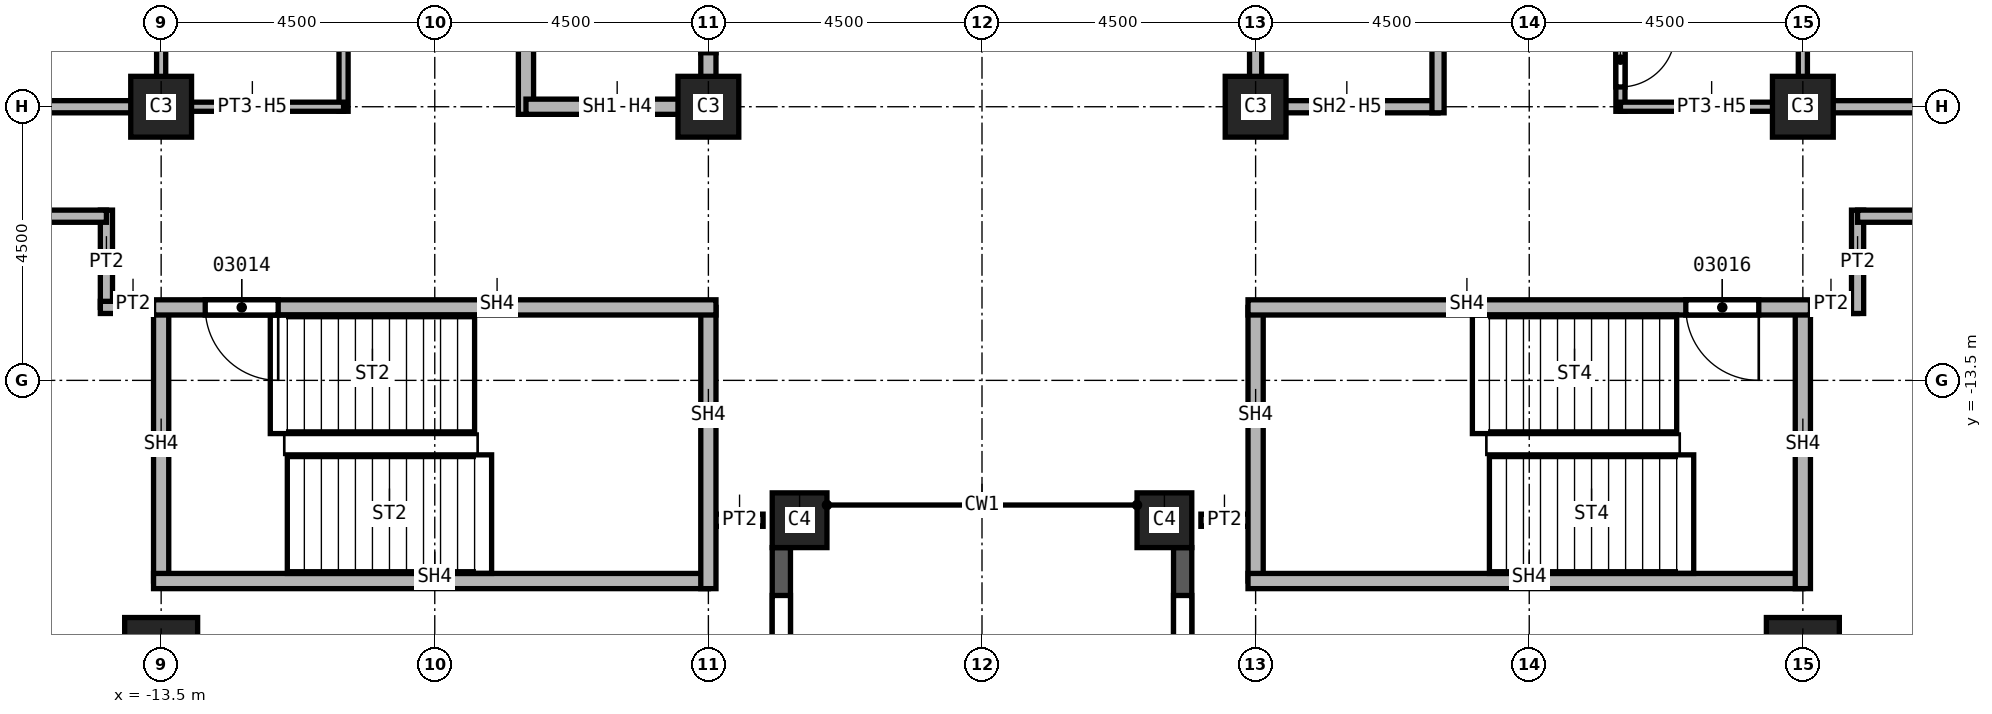
"""IFC4 building model, lengths in metres.
Left out: names, types, materials, properties, quantities, classifications, styles, units other than length and angle.
Written with IfcOpenShell. Run it as: python <this file> out.ifc"""

import sys

from ifc_helpers import new_model, si_unit, direction, frame, frame_2d, origin, origin_2d, place, context, subcontext, project, spatial, rectangle, extrude, element, fill, save


model = new_model("IFC4")
c1 = context("Model", 3, precision=1e-05, world=origin(), true_north=direction((0.0, 1.0)))
c2 = subcontext(c1, "Body", "Model", "MODEL_VIEW")
j1 = project(units=[si_unit("LENGTHUNIT", "METRE"), si_unit("PLANEANGLEUNIT", "RADIAN")], contexts=[c1])
p1 = place(None, origin())
s1 = spatial("IfcSite", under=j1, at=p1, CompositionType="ELEMENT")
p2 = place(p1, origin())
s2 = spatial("IfcBuilding", under=s1, at=p2, CompositionType="ELEMENT")
p3 = place(p2, frame((0.0, 0.0, 92.0)))
s3 = spatial("IfcBuildingStorey", under=s2, at=p3, CompositionType="ELEMENT", Elevation=92.0)
for number, where, z_axis, x_axis in (
    (1, (13.5, -18.0, 0.0), (0.0, 0.0, 1.0), (1.0, 0.0, 0.0)),
    (2, (-13.5, -18.0, 0.0), (0.0, 0.0, 1.0), (1.0, 0.0, 0.0)),
):
    element("IfcColumn", number, at=place(p3, frame(where, z_axis=z_axis, x_axis=x_axis)), inside=s3, PredefinedType="COLUMN", context=c2, shape_type="SweptSolid", body=[
        extrude(rectangle(XDim=1.2, YDim=1.2, at=origin_2d()), origin(), (0.0, 0.0, 1.0), 3.7),
    ])
for number, where, z_axis, x_axis in (
    (3, (4.5, -9.0, 0.0), (0.0, 0.0, 1.0), (1.0, 0.0, 0.0)),
    (4, (13.5, -9.0, 0.0), (0.0, 0.0, 1.0), (1.0, 0.0, 0.0)),
    (5, (-4.5, -9.0, 0.0), (0.0, 0.0, 1.0), (1.0, 0.0, 0.0)),
    (6, (-13.5, -9.0, 0.0), (0.0, 0.0, 1.0), (1.0, 0.0, 0.0)),
):
    element("IfcColumn", number, at=place(p3, frame(where, z_axis=z_axis, x_axis=x_axis)), inside=s3, PredefinedType="COLUMN", context=c2, shape_type="SweptSolid", body=[
        extrude(rectangle(XDim=1.0, YDim=1.0, at=origin_2d()), origin(), (0.0, 0.0, 1.0), 3.7),
    ])
for number, where, z_axis, x_axis in (
    (7, (3.0, -15.8, 0.0), (0.0, 0.0, 1.0), (1.0, 0.0, 0.0)),
    (8, (-3.0, -15.8, 0.0), (0.0, 0.0, 1.0), (1.0, 0.0, 0.0)),
):
    element("IfcColumn", number, at=place(p3, frame(where, z_axis=z_axis, x_axis=x_axis)), inside=s3, PredefinedType="COLUMN", context=c2, shape_type="SweptSolid", body=[
        extrude(rectangle(XDim=0.9, YDim=0.9, at=origin_2d()), origin(), (0.0, 0.0, 1.0), 3.7),
    ])
p4 = place(p3, frame((-3.3, -24.2, 0.0), z_axis=(0.0, 0.0, 1.0), x_axis=(0.0, 1.0, 0.0)))
e9 = element("IfcWall", 9, at=p4, inside=s3, PredefinedType="SOLIDWALL", context=c2, shape_type="SweptSolid", body=[
    extrude(rectangle(XDim=7.95, YDim=0.3, at=frame_2d((3.975, 0.0))), origin(), (0.0, 0.0, 1.0), 3.1),
])
p5 = place(p4, frame((0.788, 0.0, 0.8)))
e10 = element("IfcOpeningElement", 10, at=p5, cuts=e9, PredefinedType="OPENING", context=c2, shape_type="SweptSolid", body=[
    extrude(rectangle(XDim=2.4, YDim=1.95, at=frame_2d((1.2, 0.975))), frame((0.0, 0.15, 0.0), z_axis=(0.0, -1.0, 0.0), x_axis=(1.0, 0.0, 0.0)), (0.0, 0.0, 1.0), 0.3),
])
p6 = place(p4, frame((4.762, 0.0, 0.8)))
e11 = element("IfcOpeningElement", 11, at=p6, cuts=e9, PredefinedType="OPENING", context=c2, shape_type="SweptSolid", body=[
    extrude(rectangle(XDim=2.4, YDim=1.95, at=frame_2d((1.2, 0.975))), frame((0.0, 0.15, 0.0), z_axis=(0.0, -1.0, 0.0), x_axis=(1.0, 0.0, 0.0)), (0.0, 0.0, 1.0), 0.3),
])
p7 = place(p3, frame((3.3, -16.25, 0.0), z_axis=(0.0, 0.0, 1.0), x_axis=(0.0, -1.0, 0.0)))
e12 = element("IfcWall", 12, at=p7, inside=s3, PredefinedType="SOLIDWALL", context=c2, shape_type="SweptSolid", body=[
    extrude(rectangle(XDim=7.95, YDim=0.3, at=frame_2d((3.975, 0.0))), origin(), (0.0, 0.0, 1.0), 3.1),
])
p8 = place(p7, frame((0.788, 0.0, 0.8)))
e13 = element("IfcOpeningElement", 13, at=p8, cuts=e12, PredefinedType="OPENING", context=c2, shape_type="SweptSolid", body=[
    extrude(rectangle(XDim=2.4, YDim=1.95, at=frame_2d((1.2, 0.975))), frame((0.0, 0.15, 0.0), z_axis=(0.0, -1.0, 0.0), x_axis=(1.0, 0.0, 0.0)), (0.0, 0.0, 1.0), 0.3),
])
p9 = place(p7, frame((4.762, 0.0, 0.8)))
e14 = element("IfcOpeningElement", 14, at=p9, cuts=e12, PredefinedType="OPENING", context=c2, shape_type="SweptSolid", body=[
    extrude(rectangle(XDim=2.4, YDim=1.95, at=frame_2d((1.2, 0.975))), frame((0.0, 0.15, 0.0), z_axis=(0.0, -1.0, 0.0), x_axis=(1.0, 0.0, 0.0)), (0.0, 0.0, 1.0), 0.3),
])
p10 = place(p3, frame((-18.0, -9.0, 0.0), z_axis=(0.0, 0.0, 1.0), x_axis=(1.0, 0.0, 0.0)))
e15 = element("IfcWall", 15, at=p10, inside=s3, PredefinedType="PARTITIONING", context=c2, shape_type="SweptSolid", body=[
    extrude(rectangle(XDim=4.5, YDim=0.2, at=frame_2d((2.25, 0.0))), origin(), (0.0, 0.0, 1.0), 3.7),
])
p11 = place(p3, frame((-14.4, -12.3, 0.0), z_axis=(0.0, 0.0, 1.0), x_axis=(0.0, 1.0, 0.0)))
e16 = element("IfcWall", 16, at=p11, inside=s3, PredefinedType="PARTITIONING", context=c2, shape_type="SweptSolid", body=[
    extrude(rectangle(XDim=1.6, YDim=0.2, at=frame_2d((0.8, 0.0))), origin(), (0.0, 0.0, 1.0), 3.7),
])
p12 = place(p3, frame((-14.4, -10.8, 0.0), z_axis=(0.0, 0.0, 1.0), x_axis=(-1.0, 0.0, 0.0)))
e17 = element("IfcWall", 17, at=p12, inside=s3, PredefinedType="PARTITIONING", context=c2, shape_type="SweptSolid", body=[
    extrude(rectangle(XDim=3.6, YDim=0.2, at=frame_2d((1.8, 0.0))), origin(), (0.0, 0.0, 1.0), 3.7),
])
p13 = place(p3, frame((-13.375, -12.3, 0.0), z_axis=(0.0, 0.0, 1.0), x_axis=(-1.0, 0.0, 0.0)))
e18 = element("IfcWall", 18, at=p13, inside=s3, PredefinedType="PARTITIONING", context=c2, shape_type="SweptSolid", body=[
    extrude(rectangle(XDim=1.125, YDim=0.2, at=frame_2d((0.562, 0.0))), origin(), (0.0, 0.0, 1.0), 3.7),
])
for number, where, z_axis, x_axis in (
    (19, (-3.6, -15.8, 0.0), (0.0, 0.0, 1.0), (-1.0, 0.0, 0.0)),
    (20, (4.5, -15.8, 0.0), (0.0, 0.0, 1.0), (-1.0, 0.0, 0.0)),
):
    element("IfcWall", number, at=place(p3, frame(where, z_axis=z_axis, x_axis=x_axis)), inside=s3, PredefinedType="PARTITIONING", context=c2, shape_type="SweptSolid", body=[
        extrude(rectangle(XDim=0.9, YDim=0.2, at=frame_2d((0.45, 0.0))), origin(), (0.0, 0.0, 1.0), 3.7),
    ])
p14 = place(p3, frame((13.5, -9.0, 0.0), z_axis=(0.0, 0.0, 1.0), x_axis=(1.0, 0.0, 0.0)))
e21 = element("IfcWall", 21, at=p14, inside=s3, PredefinedType="PARTITIONING", context=c2, shape_type="SweptSolid", body=[
    extrude(rectangle(XDim=4.5, YDim=0.2, at=frame_2d((2.25, 0.0))), origin(), (0.0, 0.0, 1.0), 3.7),
])
p15 = place(p3, frame((14.4, -12.3, 0.0), z_axis=(0.0, 0.0, 1.0), x_axis=(-1.0, 0.0, 0.0)))
e22 = element("IfcWall", 22, at=p15, inside=s3, PredefinedType="PARTITIONING", context=c2, shape_type="SweptSolid", body=[
    extrude(rectangle(XDim=1.025, YDim=0.2, at=frame_2d((0.512, 0.0))), origin(), (0.0, 0.0, 1.0), 3.7),
])
p16 = place(p3, frame((14.4, -10.7, 0.0), z_axis=(0.0, 0.0, 1.0), x_axis=(0.0, -1.0, 0.0)))
e23 = element("IfcWall", 23, at=p16, inside=s3, PredefinedType="PARTITIONING", context=c2, shape_type="SweptSolid", body=[
    extrude(rectangle(XDim=1.7, YDim=0.2, at=frame_2d((0.85, 0.0))), origin(), (0.0, 0.0, 1.0), 3.7),
])
p17 = place(p3, frame((18.0, -10.8, 0.0), z_axis=(0.0, 0.0, 1.0), x_axis=(-1.0, 0.0, 0.0)))
e24 = element("IfcWall", 24, at=p17, inside=s3, PredefinedType="PARTITIONING", context=c2, shape_type="SweptSolid", body=[
    extrude(rectangle(XDim=3.6, YDim=0.2, at=frame_2d((1.8, 0.0))), origin(), (0.0, 0.0, 1.0), 3.7),
])
p18 = place(p3, frame((4.5, -9.1, 0.0), z_axis=(0.0, 0.0, 1.0), x_axis=(0.0, 1.0, 0.0)))
e25 = element("IfcWall", 25, at=p18, inside=s3, PredefinedType="SOLIDWALL", context=c2, shape_type="SweptSolid", body=[
    extrude(rectangle(XDim=9.1, YDim=0.2, at=frame_2d((4.55, 0.0))), origin(), (0.0, 0.0, 1.0), 2.938),
])
p19 = place(p18, frame((1.6, 0.0, 0.0)))
e26 = element("IfcOpeningElement", 26, at=p19, cuts=e25, PredefinedType="OPENING", context=c2, shape_type="SweptSolid", body=[
    extrude(rectangle(XDim=1.1, YDim=2.1, at=frame_2d((0.55, 1.05))), frame((0.0, 0.1, 0.0), z_axis=(0.0, -1.0, 0.0), x_axis=(1.0, 0.0, 0.0)), (0.0, 0.0, 1.0), 0.2),
])
p20 = place(p18, frame((6.35, 0.0, 0.0)))
e27 = element("IfcOpeningElement", 27, at=p20, cuts=e25, PredefinedType="OPENING", context=c2, shape_type="SweptSolid", body=[
    extrude(rectangle(XDim=1.1, YDim=2.1, at=frame_2d((0.55, 1.05))), frame((0.0, 0.1, 0.0), z_axis=(0.0, -1.0, 0.0), x_axis=(1.0, 0.0, 0.0)), (0.0, 0.0, 1.0), 0.2),
])
p21 = place(p3, frame((7.5, -9.0, 0.0), z_axis=(0.0, 0.0, 1.0), x_axis=(-1.0, 0.0, 0.0)))
e28 = element("IfcWall", 28, at=p21, inside=s3, PredefinedType="SOLIDWALL", context=c2, shape_type="SweptSolid", body=[
    extrude(rectangle(XDim=3.0, YDim=0.2, at=frame_2d((1.5, 0.0))), origin(), (0.0, 0.0, 1.0), 2.938),
])
p22 = place(p3, frame((7.5, -2.875, 0.0), z_axis=(0.0, 0.0, 1.0), x_axis=(0.0, -1.0, 0.0)))
e29 = element("IfcWall", 29, at=p22, inside=s3, PredefinedType="SOLIDWALL", context=c2, shape_type="SweptSolid", body=[
    extrude(rectangle(XDim=6.225, YDim=0.2, at=frame_2d((3.113, 0.0))), origin(), (0.0, 0.0, 1.0), 3.7),
])
p23 = place(p3, frame((-7.5, -9.125, 0.0), z_axis=(0.0, 0.0, 1.0), x_axis=(0.0, 1.0, 0.0)))
e30 = element("IfcWall", 30, at=p23, inside=s3, PredefinedType="SOLIDWALL", context=c2, shape_type="SweptSolid", body=[
    extrude(rectangle(XDim=12.25, YDim=0.25, at=frame_2d((6.125, 0.0))), origin(), (0.0, 0.0, 1.0), 3.7),
])
p24 = place(p3, frame((-4.5, -9.0, 0.0), z_axis=(0.0, 0.0, 1.0), x_axis=(-1.0, 0.0, 0.0)))
e31 = element("IfcWall", 31, at=p24, inside=s3, PredefinedType="SOLIDWALL", context=c2, shape_type="SweptSolid", body=[
    extrude(rectangle(XDim=3.0, YDim=0.25, at=frame_2d((1.5, 0.0))), origin(), (0.0, 0.0, 1.0), 2.938),
])
p25 = place(p3, frame((-4.5, 0.0, 0.0), z_axis=(0.0, 0.0, 1.0), x_axis=(0.0, -1.0, 0.0)))
e32 = element("IfcWall", 32, at=p25, inside=s3, PredefinedType="SOLIDWALL", context=c2, shape_type="SweptSolid", body=[
    extrude(rectangle(XDim=9.125, YDim=0.25, at=frame_2d((4.562, 0.0))), origin(), (0.0, 0.0, 1.0), 2.938),
])
p26 = place(p25, frame((7.012, 0.0, 0.0)))
e33 = element("IfcOpeningElement", 33, at=p26, cuts=e32, PredefinedType="OPENING", context=c2, shape_type="SweptSolid", body=[
    extrude(rectangle(XDim=1.1, YDim=2.1, at=frame_2d((0.55, 1.05))), frame((0.0, 0.125, 0.0), z_axis=(0.0, -1.0, 0.0), x_axis=(1.0, 0.0, 0.0)), (0.0, 0.0, 1.0), 0.25),
])
p27 = place(p25, frame((3.95, 0.0, 0.0)))
e34 = element("IfcOpeningElement", 34, at=p27, cuts=e32, PredefinedType="OPENING", context=c2, shape_type="SweptSolid", body=[
    extrude(rectangle(XDim=1.1, YDim=2.1, at=frame_2d((0.55, 1.05))), frame((0.0, 0.125, 0.0), z_axis=(0.0, -1.0, 0.0), x_axis=(1.0, 0.0, 0.0)), (0.0, 0.0, 1.0), 0.25),
])
p28 = place(p25, frame((0.95, 0.0, 0.0)))
e35 = element("IfcOpeningElement", 35, at=p28, cuts=e32, PredefinedType="OPENING", context=c2, shape_type="SweptSolid", body=[
    extrude(rectangle(XDim=1.1, YDim=2.1, at=frame_2d((0.55, 1.05))), frame((0.0, 0.125, 0.0), z_axis=(0.0, -1.0, 0.0), x_axis=(1.0, 0.0, 0.0)), (0.0, 0.0, 1.0), 0.25),
])
p29 = place(p3, frame((-13.5, -16.8, 0.0), z_axis=(0.0, 0.0, 1.0), x_axis=(0.0, 1.0, 0.0)))
e36 = element("IfcWall", 36, at=p29, inside=s3, PredefinedType="SOLIDWALL", context=c2, shape_type="SweptSolid", body=[
    extrude(rectangle(XDim=4.5, YDim=0.25, at=frame_2d((2.25, 0.0))), origin(), (0.0, 0.0, 1.0), 3.7),
])
p30 = place(p3, frame((-4.5, -16.8, 0.0), z_axis=(0.0, 0.0, 1.0), x_axis=(-1.0, 0.0, 0.0)))
e37 = element("IfcWall", 37, at=p30, inside=s3, PredefinedType="SOLIDWALL", context=c2, shape_type="SweptSolid", body=[
    extrude(rectangle(XDim=9.125, YDim=0.25, at=frame_2d((4.562, 0.0))), origin(), (0.0, 0.0, 1.0), 3.7),
])
p31 = place(p3, frame((-4.5, -12.3, 0.0), z_axis=(0.0, 0.0, 1.0), x_axis=(0.0, -1.0, 0.0)))
e38 = element("IfcWall", 38, at=p31, inside=s3, PredefinedType="SOLIDWALL", context=c2, shape_type="SweptSolid", body=[
    extrude(rectangle(XDim=4.625, YDim=0.25, at=frame_2d((2.312, 0.0))), origin(), (0.0, 0.0, 1.0), 3.7),
])
p32 = place(p3, frame((-4.375, -12.3, 0.0), z_axis=(0.0, 0.0, 1.0), x_axis=(-1.0, 0.0, 0.0)))
e39 = element("IfcWall", 39, at=p32, inside=s3, PredefinedType="SOLIDWALL", context=c2, shape_type="SweptSolid", body=[
    extrude(rectangle(XDim=9.25, YDim=0.25, at=frame_2d((4.625, 0.0))), origin(), (0.0, 0.0, 1.0), 3.7),
])
p33 = place(p32, frame((7.2, 0.0, 0.0)))
e40 = element("IfcOpeningElement", 40, at=p33, cuts=e39, PredefinedType="OPENING", context=c2, shape_type="SweptSolid", body=[
    extrude(rectangle(XDim=1.2, YDim=2.1, at=frame_2d((0.6, 1.05))), frame((0.0, 0.125, 0.0), z_axis=(0.0, -1.0, 0.0), x_axis=(1.0, 0.0, 0.0)), (0.0, 0.0, 1.0), 0.25),
])
p34 = place(p3, frame((4.5, -16.8, 0.0), z_axis=(0.0, 0.0, 1.0), x_axis=(0.0, 1.0, 0.0)))
e41 = element("IfcWall", 41, at=p34, inside=s3, PredefinedType="SOLIDWALL", context=c2, shape_type="SweptSolid", body=[
    extrude(rectangle(XDim=4.5, YDim=0.25, at=frame_2d((2.25, 0.0))), origin(), (0.0, 0.0, 1.0), 3.7),
])
p35 = place(p3, frame((13.5, -16.8, 0.0), z_axis=(0.0, 0.0, 1.0), x_axis=(-1.0, 0.0, 0.0)))
e42 = element("IfcWall", 42, at=p35, inside=s3, PredefinedType="SOLIDWALL", context=c2, shape_type="SweptSolid", body=[
    extrude(rectangle(XDim=9.125, YDim=0.25, at=frame_2d((4.562, 0.0))), origin(), (0.0, 0.0, 1.0), 3.7),
])
p36 = place(p3, frame((13.5, -12.3, 0.0), z_axis=(0.0, 0.0, 1.0), x_axis=(0.0, -1.0, 0.0)))
e43 = element("IfcWall", 43, at=p36, inside=s3, PredefinedType="SOLIDWALL", context=c2, shape_type="SweptSolid", body=[
    extrude(rectangle(XDim=4.625, YDim=0.25, at=frame_2d((2.312, 0.0))), origin(), (0.0, 0.0, 1.0), 3.7),
])
p37 = place(p3, frame((13.625, -12.3, 0.0), z_axis=(0.0, 0.0, 1.0), x_axis=(-1.0, 0.0, 0.0)))
e44 = element("IfcWall", 44, at=p37, inside=s3, PredefinedType="SOLIDWALL", context=c2, shape_type="SweptSolid", body=[
    extrude(rectangle(XDim=9.25, YDim=0.25, at=frame_2d((4.625, 0.0))), origin(), (0.0, 0.0, 1.0), 3.7),
])
p38 = place(p37, frame((0.85, 0.0, 0.0)))
e45 = element("IfcOpeningElement", 45, at=p38, cuts=e44, PredefinedType="OPENING", context=c2, shape_type="SweptSolid", body=[
    extrude(rectangle(XDim=1.2, YDim=2.1, at=frame_2d((0.6, 1.05))), frame((0.0, 0.125, 0.0), z_axis=(0.0, -1.0, 0.0), x_axis=(1.0, 0.0, 0.0)), (0.0, 0.0, 1.0), 0.25),
])
p39 = place(p3, frame((-13.5, -9.1, 0.0), z_axis=(0.0, 0.0, 1.0), x_axis=(0.0, 1.0, 0.0)))
e46 = element("IfcWall", 46, at=p39, inside=s3, PredefinedType="PARTITIONING", context=c2, shape_type="SweptSolid", body=[
    extrude(rectangle(XDim=6.1, YDim=0.15, at=frame_2d((3.05, 0.0))), origin(), (0.0, 0.0, 1.0), 2.938),
])
p40 = place(p3, frame((-10.5, -9.075, 0.0), z_axis=(0.0, 0.0, 1.0), x_axis=(0.0, 1.0, 0.0)))
e47 = element("IfcWall", 47, at=p40, inside=s3, PredefinedType="PARTITIONING", context=c2, shape_type="SweptSolid", body=[
    extrude(rectangle(XDim=6.2, YDim=0.15, at=frame_2d((3.1, 0.0))), origin(), (0.0, 0.0, 1.0), 3.7),
])
p41 = place(p40, frame((3.55, 0.0, 0.0)))
e48 = element("IfcOpeningElement", 48, at=p41, cuts=e47, PredefinedType="OPENING", context=c2, shape_type="SweptSolid", body=[
    extrude(rectangle(XDim=0.9, YDim=2.1, at=frame_2d((0.45, 1.05))), frame((0.0, 0.075, 0.0), z_axis=(0.0, -1.0, 0.0), x_axis=(1.0, 0.0, 0.0)), (0.0, 0.0, 1.0), 0.15),
])
p42 = place(p3, frame((-10.5, -9.0, 0.0), z_axis=(0.0, 0.0, 1.0), x_axis=(-1.0, 0.0, 0.0)))
e49 = element("IfcWall", 49, at=p42, inside=s3, PredefinedType="PARTITIONING", context=c2, shape_type="SweptSolid", body=[
    extrude(rectangle(XDim=3.075, YDim=0.15, at=frame_2d((1.538, 0.0))), origin(), (0.0, 0.0, 1.0), 2.938),
])
p43 = place(p3, frame((10.5, -2.875, 0.0), z_axis=(0.0, 0.0, 1.0), x_axis=(0.0, -1.0, 0.0)))
e50 = element("IfcWall", 50, at=p43, inside=s3, PredefinedType="PARTITIONING", context=c2, shape_type="SweptSolid", body=[
    extrude(rectangle(XDim=6.2, YDim=0.15, at=frame_2d((3.1, 0.0))), origin(), (0.0, 0.0, 1.0), 3.7),
])
p44 = place(p43, frame((4.9, 0.0, 0.0)))
e51 = element("IfcOpeningElement", 51, at=p44, cuts=e50, PredefinedType="OPENING", context=c2, shape_type="SweptSolid", body=[
    extrude(rectangle(XDim=0.9, YDim=2.1, at=frame_2d((0.45, 1.05))), frame((0.0, 0.075, 0.0), z_axis=(0.0, -1.0, 0.0), x_axis=(1.0, 0.0, 0.0)), (0.0, 0.0, 1.0), 0.15),
])
p45 = place(p3, frame((13.5, -3.0, 0.0), z_axis=(0.0, 0.0, 1.0), x_axis=(0.0, -1.0, 0.0)))
e52 = element("IfcWall", 52, at=p45, inside=s3, PredefinedType="PARTITIONING", context=c2, shape_type="SweptSolid", body=[
    extrude(rectangle(XDim=6.1, YDim=0.15, at=frame_2d((3.05, 0.0))), origin(), (0.0, 0.0, 1.0), 2.938),
])
p46 = place(p3, frame((13.575, -9.0, 0.0), z_axis=(0.0, 0.0, 1.0), x_axis=(-1.0, 0.0, 0.0)))
e53 = element("IfcWall", 53, at=p46, inside=s3, PredefinedType="PARTITIONING", context=c2, shape_type="SweptSolid", body=[
    extrude(rectangle(XDim=3.075, YDim=0.15, at=frame_2d((1.538, 0.0))), origin(), (0.0, 0.0, 1.0), 2.938),
])
p47 = place(p6, origin())
e54 = element("IfcWindow", 54, at=p47, inside=s3, PartitioningType="SINGLE_PANEL", PredefinedType="WINDOW", context=c2, shape_type="SweptSolid", body=[
    extrude(rectangle(XDim=2.4, YDim=1.95, at=frame_2d((1.2, 0.975))), frame((0.0, 0.03, 0.0), z_axis=(0.0, -1.0, 0.0), x_axis=(1.0, 0.0, 0.0)), (0.0, 0.0, 1.0), 0.06),
])
fill(e11, e54)
p48 = place(p8, origin())
e55 = element("IfcWindow", 55, at=p48, inside=s3, PartitioningType="SINGLE_PANEL", PredefinedType="WINDOW", context=c2, shape_type="SweptSolid", body=[
    extrude(rectangle(XDim=2.4, YDim=1.95, at=frame_2d((1.2, 0.975))), frame((0.0, 0.03, 0.0), z_axis=(0.0, -1.0, 0.0), x_axis=(1.0, 0.0, 0.0)), (0.0, 0.0, 1.0), 0.06),
])
fill(e13, e55)
p49 = place(p44, origin())
e56 = element("IfcDoor", 56, at=p49, inside=s3, OperationType="SINGLE_SWING_RIGHT", PredefinedType="DOOR", context=c2, shape_type="SweptSolid", body=[
    extrude(rectangle(XDim=0.9, YDim=2.1, at=frame_2d((0.45, 1.05))), frame((0.0, 0.025, 0.0), z_axis=(0.0, -1.0, 0.0), x_axis=(1.0, 0.0, 0.0)), (0.0, 0.0, 1.0), 0.05),
])
fill(e51, e56)
p50 = place(p33, origin())
e57 = element("IfcDoor", 57, at=p50, inside=s3, OperationType="SINGLE_SWING_LEFT", PredefinedType="DOOR", context=c2, shape_type="SweptSolid", body=[
    extrude(rectangle(XDim=1.2, YDim=2.1, at=frame_2d((0.6, 1.05))), frame((0.0, 0.025, 0.0), z_axis=(0.0, -1.0, 0.0), x_axis=(1.0, 0.0, 0.0)), (0.0, 0.0, 1.0), 0.05),
])
fill(e40, e57)
p51 = place(p38, origin())
e58 = element("IfcDoor", 58, at=p51, inside=s3, OperationType="SINGLE_SWING_LEFT", PredefinedType="DOOR", context=c2, shape_type="SweptSolid", body=[
    extrude(rectangle(XDim=1.2, YDim=2.1, at=frame_2d((0.6, 1.05))), frame((0.0, 0.025, 0.0), z_axis=(0.0, -1.0, 0.0), x_axis=(1.0, 0.0, 0.0)), (0.0, 0.0, 1.0), 0.05),
])
fill(e45, e58)
p52 = place(p26, origin())
e59 = element("IfcDoor", 59, at=p52, inside=s3, OperationType="SLIDING_TO_LEFT", PredefinedType="DOOR", context=c2, shape_type="SweptSolid", body=[
    extrude(rectangle(XDim=1.1, YDim=2.1, at=frame_2d((0.55, 1.05))), frame((0.0, 0.025, 0.0), z_axis=(0.0, -1.0, 0.0), x_axis=(1.0, 0.0, 0.0)), (0.0, 0.0, 1.0), 0.05),
])
fill(e33, e59)
save(model, sys.argv[1])
